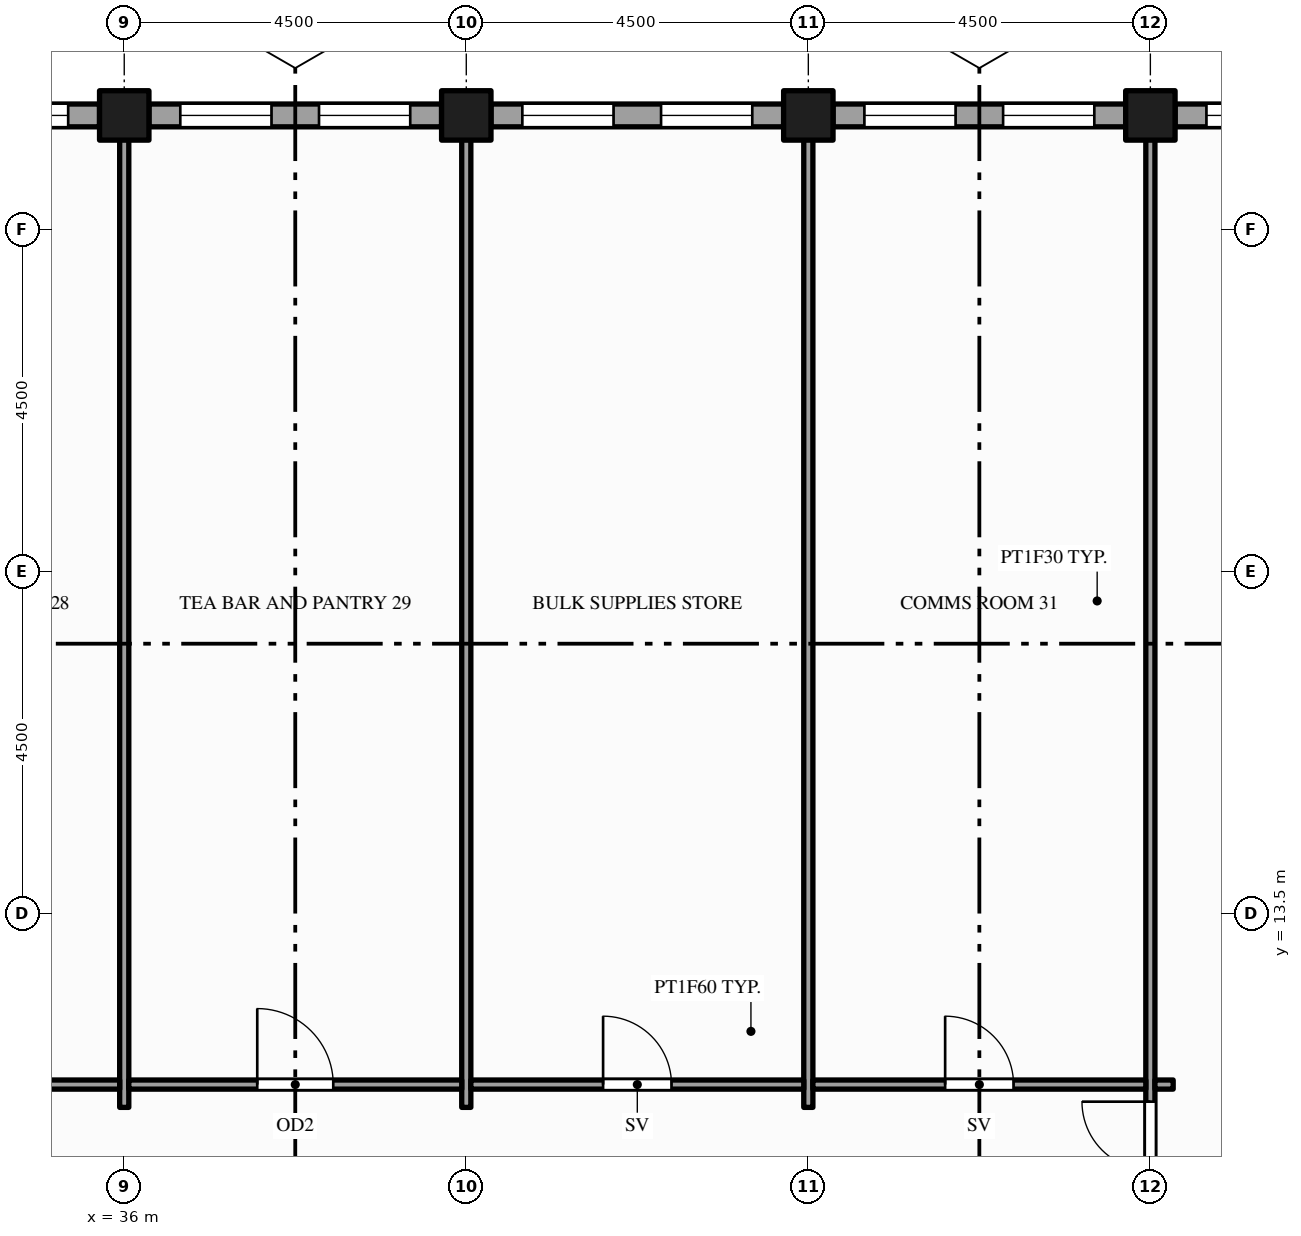
"""IFC4 building model, lengths in metres.
Left out: names, types, materials, properties, quantities, classifications, styles, units other than length and angle.
Written with IfcOpenShell. Run it as: python <this file> out.ifc"""

import sys

from ifc_helpers import new_model, si_unit, direction, frame, frame_2d, origin, origin_2d, place, context, subcontext, project, spatial, rectangle, hollow_rectangle, extrude, element, fill, save


model = new_model("IFC4")
c1 = context("Model", 3, precision=1e-05, world=origin(), true_north=direction((0.0, 1.0)))
c2 = subcontext(c1, "Body", "Model", "MODEL_VIEW")
j1 = project(units=[si_unit("LENGTHUNIT", "METRE"), si_unit("PLANEANGLEUNIT", "RADIAN")], contexts=[c1])
p1 = place(None, origin())
s1 = spatial("IfcSite", under=j1, at=p1, CompositionType="ELEMENT")
p2 = place(p1, origin())
s2 = spatial("IfcBuilding", under=s1, at=p2, CompositionType="ELEMENT")
p3 = place(p2, frame((0.0, 0.0, 249.0)))
s3 = spatial("IfcBuildingStorey", under=s2, at=p3, CompositionType="ELEMENT", Elevation=249.0)
for number, where, z_axis, x_axis in (
    (1, (36.0, 24.0, -0.15), (0.0, 0.0, 1.0), (1.0, 0.0, 0.0)),
    (2, (40.5, 24.0, -0.15), (0.0, 0.0, 1.0), (1.0, 0.0, 0.0)),
    (3, (45.0, 24.0, -0.15), (0.0, 0.0, 1.0), (1.0, 0.0, 0.0)),
    (4, (49.5, 24.0, -0.15), (0.0, 0.0, 1.0), (1.0, 0.0, 0.0)),
):
    element("IfcColumn", number, at=place(p3, frame(where, z_axis=z_axis, x_axis=x_axis)), inside=s3, PredefinedType="COLUMN", context=c2, shape_type="SweptSolid", body=[
        extrude(hollow_rectangle(XDim=0.65, YDim=0.65, WallThickness=0.032, at=origin_2d()), origin(), (0.0, 0.0, 1.0), 4.0),
    ])
p4 = place(p3, frame((53.675, 24.0, 0.0), z_axis=(0.0, 0.0, 1.0), x_axis=(-1.0, 0.0, 0.0)))
e5 = element("IfcWall", 5, at=p4, inside=s3, PredefinedType="STANDARD", context=c2, shape_type="SweptSolid", body=[
    extrude(rectangle(XDim=3.85, YDim=0.3, at=frame_2d((1.925, 0.0))), origin(), (0.0, 0.0, 1.0), 2.87),
])
p5 = place(p4, frame((0.413, 0.0, 0.9)))
e6 = element("IfcOpeningElement", 6, at=p5, cuts=e5, PredefinedType="OPENING", context=c2, shape_type="SweptSolid", body=[
    extrude(rectangle(XDim=1.2, YDim=1.75, at=frame_2d((0.6, 0.875))), frame((0.0, 0.16, 0.0), z_axis=(0.0, -1.0, 0.0), x_axis=(1.0, 0.0, 0.0)), (0.0, 0.0, 1.0), 0.32),
])
p6 = place(p4, frame((2.238, 0.0, 0.9)))
e7 = element("IfcOpeningElement", 7, at=p6, cuts=e5, PredefinedType="OPENING", context=c2, shape_type="SweptSolid", body=[
    extrude(rectangle(XDim=1.2, YDim=1.75, at=frame_2d((0.6, 0.875))), frame((0.0, 0.16, 0.0), z_axis=(0.0, -1.0, 0.0), x_axis=(1.0, 0.0, 0.0)), (0.0, 0.0, 1.0), 0.32),
])
p7 = place(p3, frame((49.175, 24.0, 0.0), z_axis=(0.0, 0.0, 1.0), x_axis=(-1.0, 0.0, 0.0)))
e8 = element("IfcWall", 8, at=p7, inside=s3, PredefinedType="STANDARD", context=c2, shape_type="SweptSolid", body=[
    extrude(rectangle(XDim=3.85, YDim=0.3, at=frame_2d((1.925, 0.0))), origin(), (0.0, 0.0, 1.0), 2.87),
])
p8 = place(p7, frame((0.413, 0.0, 0.9)))
e9 = element("IfcOpeningElement", 9, at=p8, cuts=e8, PredefinedType="OPENING", context=c2, shape_type="SweptSolid", body=[
    extrude(rectangle(XDim=1.2, YDim=1.75, at=frame_2d((0.6, 0.875))), frame((0.0, 0.16, 0.0), z_axis=(0.0, -1.0, 0.0), x_axis=(1.0, 0.0, 0.0)), (0.0, 0.0, 1.0), 0.32),
])
p9 = place(p7, frame((2.238, 0.0, 0.9)))
e10 = element("IfcOpeningElement", 10, at=p9, cuts=e8, PredefinedType="OPENING", context=c2, shape_type="SweptSolid", body=[
    extrude(rectangle(XDim=1.2, YDim=1.75, at=frame_2d((0.6, 0.875))), frame((0.0, 0.16, 0.0), z_axis=(0.0, -1.0, 0.0), x_axis=(1.0, 0.0, 0.0)), (0.0, 0.0, 1.0), 0.32),
])
p10 = place(p3, frame((44.675, 24.0, 0.0), z_axis=(0.0, 0.0, 1.0), x_axis=(-1.0, 0.0, 0.0)))
e11 = element("IfcWall", 11, at=p10, inside=s3, PredefinedType="STANDARD", context=c2, shape_type="SweptSolid", body=[
    extrude(rectangle(XDim=3.85, YDim=0.3, at=frame_2d((1.925, 0.0))), origin(), (0.0, 0.0, 1.0), 2.87),
])
p11 = place(p10, frame((0.413, 0.0, 0.9)))
e12 = element("IfcOpeningElement", 12, at=p11, cuts=e11, PredefinedType="OPENING", context=c2, shape_type="SweptSolid", body=[
    extrude(rectangle(XDim=1.2, YDim=1.75, at=frame_2d((0.6, 0.875))), frame((0.0, 0.16, 0.0), z_axis=(0.0, -1.0, 0.0), x_axis=(1.0, 0.0, 0.0)), (0.0, 0.0, 1.0), 0.32),
])
p12 = place(p10, frame((2.238, 0.0, 0.9)))
e13 = element("IfcOpeningElement", 13, at=p12, cuts=e11, PredefinedType="OPENING", context=c2, shape_type="SweptSolid", body=[
    extrude(rectangle(XDim=1.2, YDim=1.75, at=frame_2d((0.6, 0.875))), frame((0.0, 0.16, 0.0), z_axis=(0.0, -1.0, 0.0), x_axis=(1.0, 0.0, 0.0)), (0.0, 0.0, 1.0), 0.32),
])
p13 = place(p3, frame((40.175, 24.0, 0.0), z_axis=(0.0, 0.0, 1.0), x_axis=(-1.0, 0.0, 0.0)))
e14 = element("IfcWall", 14, at=p13, inside=s3, PredefinedType="STANDARD", context=c2, shape_type="SweptSolid", body=[
    extrude(rectangle(XDim=3.85, YDim=0.3, at=frame_2d((1.925, 0.0))), origin(), (0.0, 0.0, 1.0), 2.87),
])
p14 = place(p13, frame((0.413, 0.0, 0.9)))
e15 = element("IfcOpeningElement", 15, at=p14, cuts=e14, PredefinedType="OPENING", context=c2, shape_type="SweptSolid", body=[
    extrude(rectangle(XDim=1.2, YDim=1.75, at=frame_2d((0.6, 0.875))), frame((0.0, 0.16, 0.0), z_axis=(0.0, -1.0, 0.0), x_axis=(1.0, 0.0, 0.0)), (0.0, 0.0, 1.0), 0.32),
])
p15 = place(p13, frame((2.238, 0.0, 0.9)))
e16 = element("IfcOpeningElement", 16, at=p15, cuts=e14, PredefinedType="OPENING", context=c2, shape_type="SweptSolid", body=[
    extrude(rectangle(XDim=1.2, YDim=1.75, at=frame_2d((0.6, 0.875))), frame((0.0, 0.16, 0.0), z_axis=(0.0, -1.0, 0.0), x_axis=(1.0, 0.0, 0.0)), (0.0, 0.0, 1.0), 0.32),
])
p16 = place(p3, frame((35.675, 24.0, 0.0), z_axis=(0.0, 0.0, 1.0), x_axis=(-1.0, 0.0, 0.0)))
e17 = element("IfcWall", 17, at=p16, inside=s3, PredefinedType="STANDARD", context=c2, shape_type="SweptSolid", body=[
    extrude(rectangle(XDim=3.85, YDim=0.3, at=frame_2d((1.925, 0.0))), origin(), (0.0, 0.0, 1.0), 2.87),
])
p17 = place(p16, frame((0.413, 0.0, 0.9)))
e18 = element("IfcOpeningElement", 18, at=p17, cuts=e17, PredefinedType="OPENING", context=c2, shape_type="SweptSolid", body=[
    extrude(rectangle(XDim=1.2, YDim=1.75, at=frame_2d((0.6, 0.875))), frame((0.0, 0.16, 0.0), z_axis=(0.0, -1.0, 0.0), x_axis=(1.0, 0.0, 0.0)), (0.0, 0.0, 1.0), 0.32),
])
p18 = place(p16, frame((2.238, 0.0, 0.9)))
e19 = element("IfcOpeningElement", 19, at=p18, cuts=e17, PredefinedType="OPENING", context=c2, shape_type="SweptSolid", body=[
    extrude(rectangle(XDim=1.2, YDim=1.75, at=frame_2d((0.6, 0.875))), frame((0.0, 0.16, 0.0), z_axis=(0.0, -1.0, 0.0), x_axis=(1.0, 0.0, 0.0)), (0.0, 0.0, 1.0), 0.32),
])
for number, where, z_axis, x_axis in (
    (20, (36.0, 10.95, 0.0), (0.0, 0.0, 1.0), (0.0, 1.0, 0.0)),
    (21, (40.5, 10.95, 0.0), (0.0, 0.0, 1.0), (0.0, 1.0, 0.0)),
    (22, (45.0, 10.95, 0.0), (0.0, 0.0, 1.0), (0.0, 1.0, 0.0)),
):
    element("IfcWall", number, at=place(p3, frame(where, z_axis=z_axis, x_axis=x_axis)), inside=s3, PredefinedType="PARTITIONING", context=c2, shape_type="SweptSolid", body=[
        extrude(rectangle(XDim=12.9, YDim=0.12, at=frame_2d((6.45, 0.0))), origin(), (0.0, 0.0, 1.0), 2.87),
    ])
p19 = place(p3, frame((49.5, 1.65, 0.0), z_axis=(0.0, 0.0, 1.0), x_axis=(0.0, 1.0, 0.0)))
e23 = element("IfcWall", 23, at=p19, inside=s3, PredefinedType="PARTITIONING", context=c2, shape_type="SweptSolid", body=[
    extrude(rectangle(XDim=22.2, YDim=0.12, at=frame_2d((11.1, 0.0))), origin(), (0.0, 0.0, 1.0), 2.87),
])
p20 = place(p19, frame((7.575, 0.0, 0.0)))
e24 = element("IfcOpeningElement", 24, at=p20, cuts=e23, PredefinedType="OPENING", context=c2, shape_type="SweptSolid", body=[
    extrude(rectangle(XDim=1.8, YDim=2.1, at=frame_2d((0.9, 1.05))), frame((0.0, 0.07, 0.0), z_axis=(0.0, -1.0, 0.0), x_axis=(1.0, 0.0, 0.0)), (0.0, 0.0, 1.0), 0.14),
])
p21 = place(p19, frame((0.85, 0.0, 0.0)))
e25 = element("IfcOpeningElement", 25, at=p21, cuts=e23, PredefinedType="OPENING", context=c2, shape_type="SweptSolid", body=[
    extrude(rectangle(XDim=0.9, YDim=2.1, at=frame_2d((0.45, 1.05))), frame((0.0, 0.07, 0.0), z_axis=(0.0, -1.0, 0.0), x_axis=(1.0, 0.0, 0.0)), (0.0, 0.0, 1.0), 0.14),
])
p22 = place(p19, frame((3.15, 0.0, 0.0)))
e26 = element("IfcOpeningElement", 26, at=p22, cuts=e23, PredefinedType="OPENING", context=c2, shape_type="SweptSolid", body=[
    extrude(rectangle(XDim=0.9, YDim=2.1, at=frame_2d((0.45, 1.05))), frame((0.0, 0.07, 0.0), z_axis=(0.0, -1.0, 0.0), x_axis=(1.0, 0.0, 0.0)), (0.0, 0.0, 1.0), 0.14),
])
p23 = place(p19, frame((5.35, 0.0, 0.0)))
e27 = element("IfcOpeningElement", 27, at=p23, cuts=e23, PredefinedType="OPENING", context=c2, shape_type="SweptSolid", body=[
    extrude(rectangle(XDim=1.0, YDim=2.1, at=frame_2d((0.5, 1.05))), frame((0.0, 0.07, 0.0), z_axis=(0.0, -1.0, 0.0), x_axis=(1.0, 0.0, 0.0)), (0.0, 0.0, 1.0), 0.14),
])
p24 = place(p3, frame((31.56, 11.25, 0.0), z_axis=(0.0, 0.0, 1.0), x_axis=(1.0, 0.0, 0.0)))
e28 = element("IfcWall", 28, at=p24, inside=s3, PredefinedType="PARTITIONING", context=c2, shape_type="SweptSolid", body=[
    extrude(rectangle(XDim=4.38, YDim=0.12, at=frame_2d((2.19, 0.0))), origin(), (0.0, 0.0, 1.0), 2.87),
])
p25 = place(p24, frame((1.69, 0.0, 0.0)))
e29 = element("IfcOpeningElement", 29, at=p25, cuts=e28, PredefinedType="OPENING", context=c2, shape_type="SweptSolid", body=[
    extrude(rectangle(XDim=1.0, YDim=2.1, at=frame_2d((0.5, 1.05))), frame((0.0, 0.07, 0.0), z_axis=(0.0, -1.0, 0.0), x_axis=(1.0, 0.0, 0.0)), (0.0, 0.0, 1.0), 0.14),
])
p26 = place(p3, frame((36.06, 11.25, 0.0), z_axis=(0.0, 0.0, 1.0), x_axis=(1.0, 0.0, 0.0)))
e30 = element("IfcWall", 30, at=p26, inside=s3, PredefinedType="PARTITIONING", context=c2, shape_type="SweptSolid", body=[
    extrude(rectangle(XDim=4.38, YDim=0.12, at=frame_2d((2.19, 0.0))), origin(), (0.0, 0.0, 1.0), 2.87),
])
p27 = place(p26, frame((1.69, 0.0, 0.0)))
e31 = element("IfcOpeningElement", 31, at=p27, cuts=e30, PredefinedType="OPENING", context=c2, shape_type="SweptSolid", body=[
    extrude(rectangle(XDim=1.0, YDim=2.1, at=frame_2d((0.5, 1.05))), frame((0.0, 0.07, 0.0), z_axis=(0.0, -1.0, 0.0), x_axis=(1.0, 0.0, 0.0)), (0.0, 0.0, 1.0), 0.14),
])
p28 = place(p3, frame((40.56, 11.25, 0.0), z_axis=(0.0, 0.0, 1.0), x_axis=(1.0, 0.0, 0.0)))
e32 = element("IfcWall", 32, at=p28, inside=s3, PredefinedType="PARTITIONING", context=c2, shape_type="SweptSolid", body=[
    extrude(rectangle(XDim=4.38, YDim=0.12, at=frame_2d((2.19, 0.0))), origin(), (0.0, 0.0, 1.0), 2.87),
])
p29 = place(p28, frame((1.74, 0.0, 0.0)))
e33 = element("IfcOpeningElement", 33, at=p29, cuts=e32, PredefinedType="OPENING", context=c2, shape_type="SweptSolid", body=[
    extrude(rectangle(XDim=0.9, YDim=2.1, at=frame_2d((0.45, 1.05))), frame((0.0, 0.07, 0.0), z_axis=(0.0, -1.0, 0.0), x_axis=(1.0, 0.0, 0.0)), (0.0, 0.0, 1.0), 0.14),
])
p30 = place(p3, frame((45.06, 11.25, 0.0), z_axis=(0.0, 0.0, 1.0), x_axis=(1.0, 0.0, 0.0)))
e34 = element("IfcWall", 34, at=p30, inside=s3, PredefinedType="PARTITIONING", context=c2, shape_type="SweptSolid", body=[
    extrude(rectangle(XDim=4.38, YDim=0.12, at=frame_2d((2.19, 0.0))), origin(), (0.0, 0.0, 1.0), 2.87),
])
p31 = place(p30, frame((1.74, 0.0, 0.0)))
e35 = element("IfcOpeningElement", 35, at=p31, cuts=e34, PredefinedType="OPENING", context=c2, shape_type="SweptSolid", body=[
    extrude(rectangle(XDim=0.9, YDim=2.1, at=frame_2d((0.45, 1.05))), frame((0.0, 0.07, 0.0), z_axis=(0.0, -1.0, 0.0), x_axis=(1.0, 0.0, 0.0)), (0.0, 0.0, 1.0), 0.14),
])
p32 = place(p3, frame((49.56, 11.25, 0.0), z_axis=(0.0, 0.0, 1.0), x_axis=(1.0, 0.0, 0.0)))
e36 = element("IfcWall", 36, at=p32, inside=s3, PredefinedType="PARTITIONING", context=c2, shape_type="SweptSolid", body=[
    extrude(rectangle(XDim=0.24, YDim=0.12, at=frame_2d((0.12, 0.0))), origin(), (0.0, 0.0, 1.0), 2.87),
])
p33 = place(p6, origin())
e37 = element("IfcWindow", 37, at=p33, inside=s3, PartitioningType="SINGLE_PANEL", PredefinedType="WINDOW", context=c2, shape_type="SweptSolid", body=[
    extrude(rectangle(XDim=1.2, YDim=1.75, at=frame_2d((0.6, 0.875))), frame((0.0, 0.03, 0.0), z_axis=(0.0, -1.0, 0.0), x_axis=(1.0, 0.0, 0.0)), (0.0, 0.0, 1.0), 0.06),
])
fill(e7, e37)
p34 = place(p8, origin())
e38 = element("IfcWindow", 38, at=p34, inside=s3, PartitioningType="SINGLE_PANEL", PredefinedType="WINDOW", context=c2, shape_type="SweptSolid", body=[
    extrude(rectangle(XDim=1.2, YDim=1.75, at=frame_2d((0.6, 0.875))), frame((0.0, 0.03, 0.0), z_axis=(0.0, -1.0, 0.0), x_axis=(1.0, 0.0, 0.0)), (0.0, 0.0, 1.0), 0.06),
])
fill(e9, e38)
p35 = place(p9, origin())
e39 = element("IfcWindow", 39, at=p35, inside=s3, PartitioningType="SINGLE_PANEL", PredefinedType="WINDOW", context=c2, shape_type="SweptSolid", body=[
    extrude(rectangle(XDim=1.2, YDim=1.75, at=frame_2d((0.6, 0.875))), frame((0.0, 0.03, 0.0), z_axis=(0.0, -1.0, 0.0), x_axis=(1.0, 0.0, 0.0)), (0.0, 0.0, 1.0), 0.06),
])
fill(e10, e39)
p36 = place(p11, origin())
e40 = element("IfcWindow", 40, at=p36, inside=s3, PartitioningType="SINGLE_PANEL", PredefinedType="WINDOW", context=c2, shape_type="SweptSolid", body=[
    extrude(rectangle(XDim=1.2, YDim=1.75, at=frame_2d((0.6, 0.875))), frame((0.0, 0.03, 0.0), z_axis=(0.0, -1.0, 0.0), x_axis=(1.0, 0.0, 0.0)), (0.0, 0.0, 1.0), 0.06),
])
fill(e12, e40)
p37 = place(p12, origin())
e41 = element("IfcWindow", 41, at=p37, inside=s3, PartitioningType="SINGLE_PANEL", PredefinedType="WINDOW", context=c2, shape_type="SweptSolid", body=[
    extrude(rectangle(XDim=1.2, YDim=1.75, at=frame_2d((0.6, 0.875))), frame((0.0, 0.03, 0.0), z_axis=(0.0, -1.0, 0.0), x_axis=(1.0, 0.0, 0.0)), (0.0, 0.0, 1.0), 0.06),
])
fill(e13, e41)
p38 = place(p14, origin())
e42 = element("IfcWindow", 42, at=p38, inside=s3, PartitioningType="SINGLE_PANEL", PredefinedType="WINDOW", context=c2, shape_type="SweptSolid", body=[
    extrude(rectangle(XDim=1.2, YDim=1.75, at=frame_2d((0.6, 0.875))), frame((0.0, 0.03, 0.0), z_axis=(0.0, -1.0, 0.0), x_axis=(1.0, 0.0, 0.0)), (0.0, 0.0, 1.0), 0.06),
])
fill(e15, e42)
p39 = place(p15, origin())
e43 = element("IfcWindow", 43, at=p39, inside=s3, PartitioningType="SINGLE_PANEL", PredefinedType="WINDOW", context=c2, shape_type="SweptSolid", body=[
    extrude(rectangle(XDim=1.2, YDim=1.75, at=frame_2d((0.6, 0.875))), frame((0.0, 0.03, 0.0), z_axis=(0.0, -1.0, 0.0), x_axis=(1.0, 0.0, 0.0)), (0.0, 0.0, 1.0), 0.06),
])
fill(e16, e43)
p40 = place(p17, origin())
e44 = element("IfcWindow", 44, at=p40, inside=s3, PartitioningType="SINGLE_PANEL", PredefinedType="WINDOW", context=c2, shape_type="SweptSolid", body=[
    extrude(rectangle(XDim=1.2, YDim=1.75, at=frame_2d((0.6, 0.875))), frame((0.0, 0.03, 0.0), z_axis=(0.0, -1.0, 0.0), x_axis=(1.0, 0.0, 0.0)), (0.0, 0.0, 1.0), 0.06),
])
fill(e18, e44)
p41 = place(p20, origin())
e45 = element("IfcDoor", 45, at=p41, inside=s3, OperationType="DOUBLE_DOOR_SINGLE_SWING", PredefinedType="DOOR", context=c2, shape_type="SweptSolid", body=[
    extrude(rectangle(XDim=1.8, YDim=2.1, at=frame_2d((0.9, 1.05))), frame((0.0, 0.025, 0.0), z_axis=(0.0, -1.0, 0.0), x_axis=(1.0, 0.0, 0.0)), (0.0, 0.0, 1.0), 0.05),
])
fill(e24, e45)
p42 = place(p27, origin())
e46 = element("IfcDoor", 46, at=p42, inside=s3, OperationType="SINGLE_SWING_LEFT", PredefinedType="DOOR", context=c2, shape_type="SweptSolid", body=[
    extrude(rectangle(XDim=1.0, YDim=2.1, at=frame_2d((0.5, 1.05))), frame((0.0, 0.025, 0.0), z_axis=(0.0, -1.0, 0.0), x_axis=(1.0, 0.0, 0.0)), (0.0, 0.0, 1.0), 0.05),
])
fill(e31, e46)
p43 = place(p29, origin())
e47 = element("IfcDoor", 47, at=p43, inside=s3, OperationType="SINGLE_SWING_LEFT", PredefinedType="DOOR", context=c2, shape_type="SweptSolid", body=[
    extrude(rectangle(XDim=0.9, YDim=2.1, at=frame_2d((0.45, 1.05))), frame((0.0, 0.025, 0.0), z_axis=(0.0, -1.0, 0.0), x_axis=(1.0, 0.0, 0.0)), (0.0, 0.0, 1.0), 0.05),
])
fill(e33, e47)
p44 = place(p31, origin())
e48 = element("IfcDoor", 48, at=p44, inside=s3, OperationType="SINGLE_SWING_LEFT", PredefinedType="DOOR", context=c2, shape_type="SweptSolid", body=[
    extrude(rectangle(XDim=0.9, YDim=2.1, at=frame_2d((0.45, 1.05))), frame((0.0, 0.025, 0.0), z_axis=(0.0, -1.0, 0.0), x_axis=(1.0, 0.0, 0.0)), (0.0, 0.0, 1.0), 0.05),
])
fill(e35, e48)
save(model, sys.argv[1])
